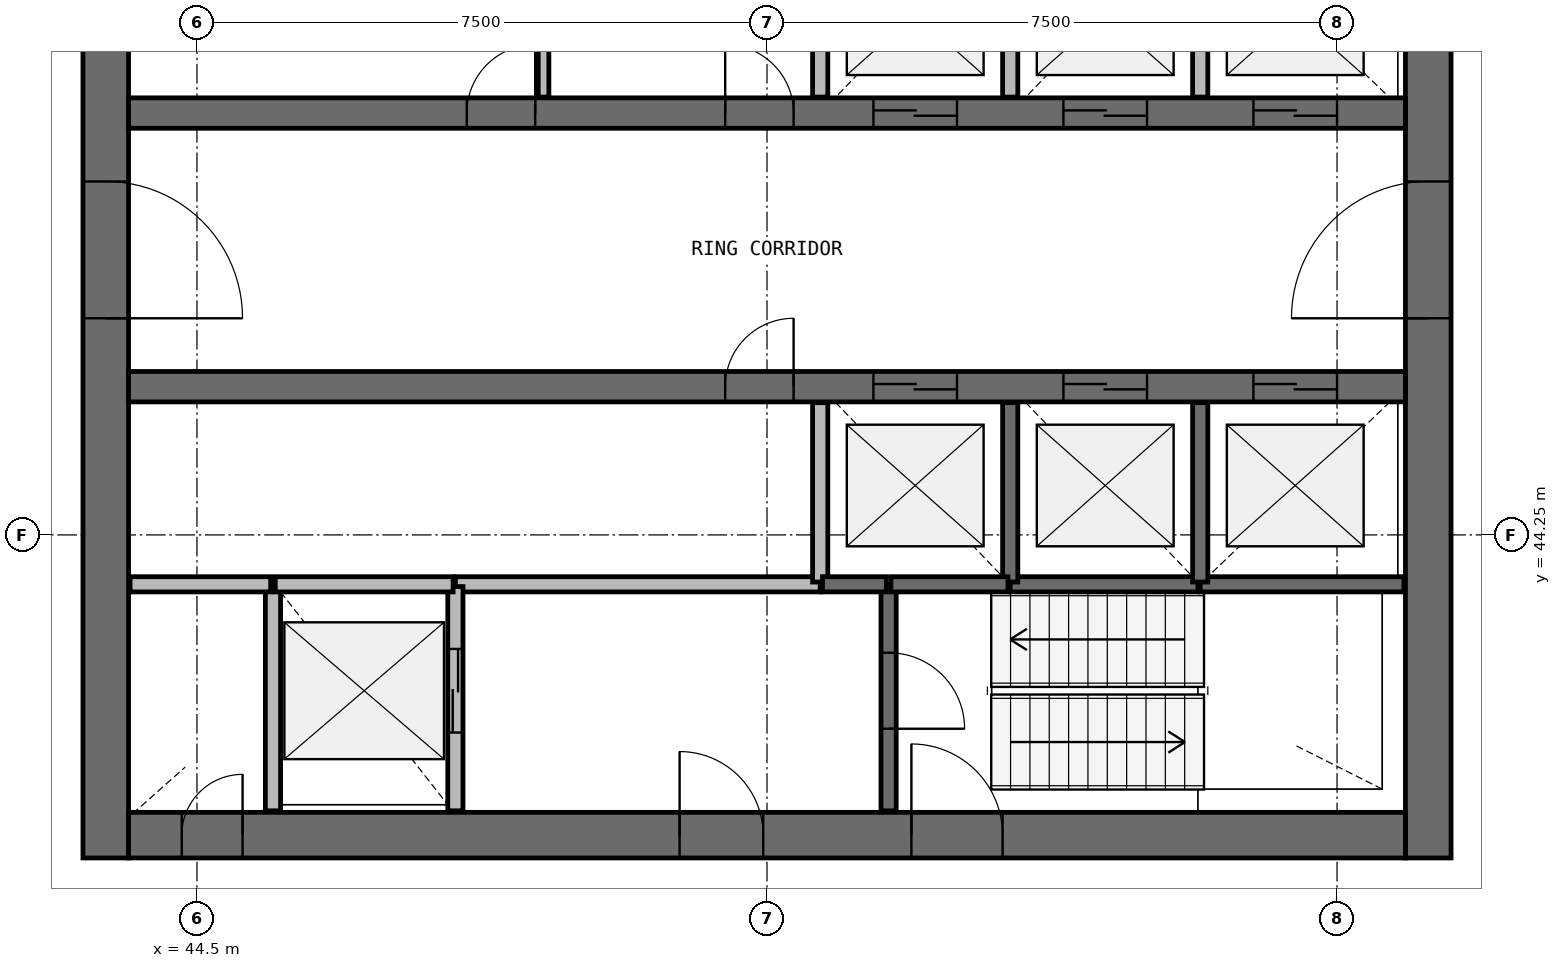
"""IFC4 building model, lengths in metres.
Left out: names, types, materials, properties, quantities, classifications, styles, units other than length and angle.
Written with IfcOpenShell. Run it as: python <this file> out.ifc"""

import sys

from ifc_helpers import new_model, si_unit, direction, frame, frame_2d, origin, place, context, subcontext, project, spatial, rectangle, extrude, source, transform, mapped, element, fill, save


model = new_model("IFC4")
c1 = context("Model", 3, precision=1e-05, world=origin(), true_north=direction((0.0, 1.0)))
c2 = subcontext(c1, "Body", "Model", "MODEL_VIEW")
j1 = project(units=[si_unit("LENGTHUNIT", "METRE"), si_unit("PLANEANGLEUNIT", "RADIAN")], contexts=[c1])
p1 = place(None, origin())
s1 = spatial("IfcSite", under=j1, at=p1, CompositionType="ELEMENT")
p2 = place(p1, origin())
s2 = spatial("IfcBuilding", under=s1, at=p2, CompositionType="ELEMENT")
p3 = place(p2, frame((0.0, 0.0, 254.0)))
s3 = spatial("IfcBuildingStorey", under=s2, at=p3, CompositionType="ELEMENT", Elevation=254.0)
p4 = place(p3, frame((60.7, 40.0, 0.0), z_axis=(0.0, 0.0, 1.0), x_axis=(0.0, 1.0, 0.0)))
e1 = element("IfcWall", 1, at=p4, inside=s3, PredefinedType="SHEAR", context=c2, shape_type="SweptSolid", body=[
    extrude(rectangle(XDim=16.0, YDim=0.6, at=frame_2d((8.0, 0.0))), origin(), (0.0, 0.0, 1.0), 3.9),
])
p5 = place(p4, frame((7.1, 0.0, 0.0)))
e2 = element("IfcOpeningElement", 2, at=p5, cuts=e1, PredefinedType="OPENING", context=c2, shape_type="SweptSolid", body=[
    extrude(rectangle(XDim=1.8, YDim=2.1, at=frame_2d((0.9, 1.05))), frame((0.0, 0.31, 0.0), z_axis=(0.0, -1.0, 0.0), x_axis=(1.0, 0.0, 0.0)), (0.0, 0.0, 1.0), 0.62),
])
p6 = place(p3, frame((43.3, 56.0, 0.0), z_axis=(0.0, 0.0, 1.0), x_axis=(0.0, -1.0, 0.0)))
e3 = element("IfcWall", 3, at=p6, inside=s3, PredefinedType="SHEAR", context=c2, shape_type="SweptSolid", body=[
    extrude(rectangle(XDim=16.0, YDim=0.6, at=frame_2d((8.0, 0.0))), origin(), (0.0, 0.0, 1.0), 3.9),
])
p7 = place(p6, frame((7.1, 0.0, 0.0)))
e4 = element("IfcOpeningElement", 4, at=p7, cuts=e3, PredefinedType="OPENING", context=c2, shape_type="SweptSolid", body=[
    extrude(rectangle(XDim=1.8, YDim=2.1, at=frame_2d((0.9, 1.05))), frame((0.0, 0.31, 0.0), z_axis=(0.0, -1.0, 0.0), x_axis=(1.0, 0.0, 0.0)), (0.0, 0.0, 1.0), 0.62),
])
p8 = place(p3, frame((43.6, 40.3, 0.0), z_axis=(0.0, 0.0, 1.0), x_axis=(1.0, 0.0, 0.0)))
e5 = element("IfcWall", 5, at=p8, inside=s3, PredefinedType="SHEAR", context=c2, shape_type="SweptSolid", body=[
    extrude(rectangle(XDim=16.8, YDim=0.6, at=frame_2d((8.4, 0.0))), origin(), (0.0, 0.0, 1.0), 3.9),
])
p9 = place(p8, frame((10.3, 0.0, 0.0)))
e6 = element("IfcOpeningElement", 6, at=p9, cuts=e5, PredefinedType="OPENING", context=c2, shape_type="SweptSolid", body=[
    extrude(rectangle(XDim=1.2, YDim=2.1, at=frame_2d((0.6, 1.05))), frame((0.0, 0.31, 0.0), z_axis=(0.0, -1.0, 0.0), x_axis=(1.0, 0.0, 0.0)), (0.0, 0.0, 1.0), 0.62),
])
p10 = place(p8, frame((7.25, 0.0, 0.0)))
e7 = element("IfcOpeningElement", 7, at=p10, cuts=e5, PredefinedType="OPENING", context=c2, shape_type="SweptSolid", body=[
    extrude(rectangle(XDim=1.1, YDim=2.1, at=frame_2d((0.55, 1.05))), frame((0.0, 0.31, 0.0), z_axis=(0.0, -1.0, 0.0), x_axis=(1.0, 0.0, 0.0)), (0.0, 0.0, 1.0), 0.62),
])
p11 = place(p8, frame((0.7, 0.0, 0.0)))
e8 = element("IfcOpeningElement", 8, at=p11, cuts=e5, PredefinedType="OPENING", context=c2, shape_type="SweptSolid", body=[
    extrude(rectangle(XDim=0.8, YDim=2.1, at=frame_2d((0.4, 1.05))), frame((0.0, 0.31, 0.0), z_axis=(0.0, -1.0, 0.0), x_axis=(1.0, 0.0, 0.0)), (0.0, 0.0, 1.0), 0.62),
])
p12 = place(p3, frame((43.6, 49.8, 0.0), z_axis=(0.0, 0.0, 1.0), x_axis=(1.0, 0.0, 0.0)))
e9 = element("IfcWall", 9, at=p12, inside=s3, PredefinedType="SHEAR", context=c2, shape_type="SweptSolid", body=[
    extrude(rectangle(XDim=16.8, YDim=0.4, at=frame_2d((8.4, 0.0))), origin(), (0.0, 0.0, 1.0), 3.9),
])
p13 = place(p12, frame((9.8, 0.0, 0.0)))
e10 = element("IfcOpeningElement", 10, at=p13, cuts=e9, PredefinedType="OPENING", context=c2, shape_type="SweptSolid", body=[
    extrude(rectangle(XDim=1.1, YDim=2.1, at=frame_2d((0.55, 1.05))), frame((0.0, 0.21, 0.0), z_axis=(0.0, -1.0, 0.0), x_axis=(1.0, 0.0, 0.0)), (0.0, 0.0, 1.0), 0.42),
])
p14 = place(p12, frame((12.3, 0.0, 0.0)))
e11 = element("IfcOpeningElement", 11, at=p14, cuts=e9, PredefinedType="OPENING", context=c2, shape_type="SweptSolid", body=[
    extrude(rectangle(XDim=1.1, YDim=2.1, at=frame_2d((0.55, 1.05))), frame((0.0, 0.21, 0.0), z_axis=(0.0, -1.0, 0.0), x_axis=(1.0, 0.0, 0.0)), (0.0, 0.0, 1.0), 0.42),
])
p15 = place(p12, frame((14.8, 0.0, 0.0)))
e12 = element("IfcOpeningElement", 12, at=p15, cuts=e9, PredefinedType="OPENING", context=c2, shape_type="SweptSolid", body=[
    extrude(rectangle(XDim=1.1, YDim=2.1, at=frame_2d((0.55, 1.05))), frame((0.0, 0.21, 0.0), z_axis=(0.0, -1.0, 0.0), x_axis=(1.0, 0.0, 0.0)), (0.0, 0.0, 1.0), 0.42),
])
p16 = place(p12, frame((4.45, 0.0, 0.0)))
e13 = element("IfcOpeningElement", 13, at=p16, cuts=e9, PredefinedType="OPENING", context=c2, shape_type="SweptSolid", body=[
    extrude(rectangle(XDim=0.9, YDim=2.1, at=frame_2d((0.45, 1.05))), frame((0.0, 0.21, 0.0), z_axis=(0.0, -1.0, 0.0), x_axis=(1.0, 0.0, 0.0)), (0.0, 0.0, 1.0), 0.42),
])
p17 = place(p12, frame((7.85, 0.0, 0.0)))
e14 = element("IfcOpeningElement", 14, at=p17, cuts=e9, PredefinedType="OPENING", context=c2, shape_type="SweptSolid", body=[
    extrude(rectangle(XDim=0.9, YDim=2.1, at=frame_2d((0.45, 1.05))), frame((0.0, 0.21, 0.0), z_axis=(0.0, -1.0, 0.0), x_axis=(1.0, 0.0, 0.0)), (0.0, 0.0, 1.0), 0.42),
])
p18 = place(p3, frame((43.6, 46.2, 0.0), z_axis=(0.0, 0.0, 1.0), x_axis=(1.0, 0.0, 0.0)))
e15 = element("IfcWall", 15, at=p18, inside=s3, PredefinedType="SHEAR", context=c2, shape_type="SweptSolid", body=[
    extrude(rectangle(XDim=16.8, YDim=0.4, at=frame_2d((8.4, 0.0))), origin(), (0.0, 0.0, 1.0), 3.9),
])
p19 = place(p18, frame((9.8, 0.0, 0.0)))
e16 = element("IfcOpeningElement", 16, at=p19, cuts=e15, PredefinedType="OPENING", context=c2, shape_type="SweptSolid", body=[
    extrude(rectangle(XDim=1.1, YDim=2.1, at=frame_2d((0.55, 1.05))), frame((0.0, 0.21, 0.0), z_axis=(0.0, -1.0, 0.0), x_axis=(1.0, 0.0, 0.0)), (0.0, 0.0, 1.0), 0.42),
])
p20 = place(p18, frame((12.3, 0.0, 0.0)))
e17 = element("IfcOpeningElement", 17, at=p20, cuts=e15, PredefinedType="OPENING", context=c2, shape_type="SweptSolid", body=[
    extrude(rectangle(XDim=1.1, YDim=2.1, at=frame_2d((0.55, 1.05))), frame((0.0, 0.21, 0.0), z_axis=(0.0, -1.0, 0.0), x_axis=(1.0, 0.0, 0.0)), (0.0, 0.0, 1.0), 0.42),
])
p21 = place(p18, frame((14.8, 0.0, 0.0)))
e18 = element("IfcOpeningElement", 18, at=p21, cuts=e15, PredefinedType="OPENING", context=c2, shape_type="SweptSolid", body=[
    extrude(rectangle(XDim=1.1, YDim=2.1, at=frame_2d((0.55, 1.05))), frame((0.0, 0.21, 0.0), z_axis=(0.0, -1.0, 0.0), x_axis=(1.0, 0.0, 0.0)), (0.0, 0.0, 1.0), 0.42),
])
p22 = place(p18, frame((7.85, 0.0, 0.0)))
e19 = element("IfcOpeningElement", 19, at=p22, cuts=e15, PredefinedType="OPENING", context=c2, shape_type="SweptSolid", body=[
    extrude(rectangle(XDim=0.9, YDim=2.1, at=frame_2d((0.45, 1.05))), frame((0.0, 0.21, 0.0), z_axis=(0.0, -1.0, 0.0), x_axis=(1.0, 0.0, 0.0)), (0.0, 0.0, 1.0), 0.42),
])
p23 = place(p3, frame((52.7, 43.6, 0.0), z_axis=(0.0, 0.0, 1.0), x_axis=(-1.0, 0.0, 0.0)))
e20 = element("IfcWall", 20, at=p23, inside=s3, PredefinedType="SOLIDWALL", context=c2, shape_type="SweptSolid", body=[
    extrude(rectangle(XDim=4.8, YDim=0.2, at=frame_2d((2.4, 0.0))), origin(), (0.0, 0.0, 1.0), 3.58),
])
p24 = place(p3, frame((45.5, 43.6, 0.0), z_axis=(0.0, 0.0, 1.0), x_axis=(0.0, -1.0, 0.0)))
e21 = element("IfcWall", 21, at=p24, inside=s3, PredefinedType="SOLIDWALL", context=c2, shape_type="SweptSolid", body=[
    extrude(rectangle(XDim=2.98, YDim=0.2, at=frame_2d((1.49, 0.0))), origin(), (0.0, 0.0, 1.0), 3.58),
])
p25 = place(p3, frame((47.9, 40.62, 0.0), z_axis=(0.0, 0.0, 1.0), x_axis=(0.0, 1.0, 0.0)))
e22 = element("IfcWall", 22, at=p25, inside=s3, PredefinedType="SOLIDWALL", context=c2, shape_type="SweptSolid", body=[
    extrude(rectangle(XDim=2.95, YDim=0.2, at=frame_2d((1.475, 0.0))), origin(), (0.0, 0.0, 1.0), 3.58),
])
p26 = place(p25, frame((1.03, 0.0, 0.0)))
e23 = element("IfcOpeningElement", 23, at=p26, cuts=e22, PredefinedType="OPENING", context=c2, shape_type="SweptSolid", body=[
    extrude(rectangle(XDim=1.1, YDim=2.1, at=frame_2d((0.55, 1.05))), frame((0.0, 0.11, 0.0), z_axis=(0.0, -1.0, 0.0), x_axis=(1.0, 0.0, 0.0)), (0.0, 0.0, 1.0), 0.22),
])
p27 = place(p3, frame((53.6, 43.6, 0.0), z_axis=(0.0, 0.0, 1.0), x_axis=(0.0, -1.0, 0.0)))
e24 = element("IfcWall", 24, at=p27, inside=s3, PredefinedType="SOLIDWALL", context=c2, shape_type="SweptSolid", body=[
    extrude(rectangle(XDim=2.98, YDim=0.2, at=frame_2d((1.49, 0.0))), origin(), (0.0, 0.0, 1.0), 3.58),
])
p28 = place(p27, frame((0.9, 0.0, 0.0)))
e25 = element("IfcOpeningElement", 25, at=p28, cuts=e24, PredefinedType="OPENING", context=c2, shape_type="SweptSolid", body=[
    extrude(rectangle(XDim=1.0, YDim=2.1, at=frame_2d((0.5, 1.05))), frame((0.0, 0.11, 0.0), z_axis=(0.0, -1.0, 0.0), x_axis=(1.0, 0.0, 0.0)), (0.0, 0.0, 1.0), 0.22),
])
p29 = place(p3, frame((57.7, 43.6, 0.0), z_axis=(0.0, 0.0, 1.0), x_axis=(1.0, 0.0, 0.0)))
e26 = element("IfcWall", 26, at=p29, inside=s3, PredefinedType="SOLIDWALL", context=c2, shape_type="SweptSolid", body=[
    extrude(rectangle(XDim=2.68, YDim=0.2, at=frame_2d((1.34, 0.0))), origin(), (0.0, 0.0, 1.0), 3.58),
])
p30 = place(p3, frame((55.2, 43.6, 0.0), z_axis=(0.0, 0.0, 1.0), x_axis=(1.0, 0.0, 0.0)))
e27 = element("IfcWall", 27, at=p30, inside=s3, PredefinedType="SOLIDWALL", context=c2, shape_type="SweptSolid", body=[
    extrude(rectangle(XDim=2.47, YDim=0.2, at=frame_2d((1.235, 0.0))), origin(), (0.0, 0.0, 1.0), 3.58),
])
p31 = place(p3, frame((47.87, 43.6, 0.0), z_axis=(0.0, 0.0, 1.0), x_axis=(-1.0, 0.0, 0.0)))
e28 = element("IfcWall", 28, at=p31, inside=s3, PredefinedType="SOLIDWALL", context=c2, shape_type="SweptSolid", body=[
    extrude(rectangle(XDim=2.34, YDim=0.2, at=frame_2d((1.17, 0.0))), origin(), (0.0, 0.0, 1.0), 3.58),
])
for number, where, z_axis, x_axis in (
    (29, (52.7, 45.99, 0.0), (0.0, 0.0, 1.0), (0.0, -1.0, 0.0)),
    (30, (52.7, 52.37, 0.0), (0.0, 0.0, 1.0), (0.0, -1.0, 0.0)),
    (31, (55.2, 43.63, 0.0), (0.0, 0.0, 1.0), (0.0, 1.0, 0.0)),
    (32, (55.2, 50.01, 0.0), (0.0, 0.0, 1.0), (0.0, 1.0, 0.0)),
    (33, (57.7, 43.63, 0.0), (0.0, 0.0, 1.0), (0.0, 1.0, 0.0)),
):
    element("IfcWall", number, at=place(p3, frame(where, z_axis=z_axis, x_axis=x_axis)), inside=s3, PredefinedType="SOLIDWALL", context=c2, shape_type="SweptSolid", body=[
        extrude(rectangle(XDim=2.36, YDim=0.2, at=frame_2d((1.18, 0.0))), origin(), (0.0, 0.0, 1.0), 3.58),
    ])
p32 = place(p3, frame((57.7, 50.01, 0.0), z_axis=(0.0, 0.0, 1.0), x_axis=(0.0, 1.0, 0.0)))
e34 = element("IfcWall", 34, at=p32, inside=s3, PredefinedType="SOLIDWALL", context=c2, shape_type="SweptSolid", body=[
    extrude(rectangle(XDim=2.39, YDim=0.2, at=frame_2d((1.195, 0.0))), origin(), (0.0, 0.0, 1.0), 3.58),
])
p33 = place(p3, frame((45.47, 43.6, 0.0), z_axis=(0.0, 0.0, 1.0), x_axis=(-1.0, 0.0, 0.0)))
e35 = element("IfcWall", 35, at=p33, inside=s3, PredefinedType="SOLIDWALL", context=c2, shape_type="SweptSolid", body=[
    extrude(rectangle(XDim=1.85, YDim=0.2, at=frame_2d((0.925, 0.0))), origin(), (0.0, 0.0, 1.0), 3.58),
])
p34 = place(p3, frame((53.63, 43.6, 0.0), z_axis=(0.0, 0.0, 1.0), x_axis=(1.0, 0.0, 0.0)))
e36 = element("IfcWall", 36, at=p34, inside=s3, PredefinedType="SOLIDWALL", context=c2, shape_type="SweptSolid", body=[
    extrude(rectangle(XDim=1.54, YDim=0.2, at=frame_2d((0.77, 0.0))), origin(), (0.0, 0.0, 1.0), 3.58),
])
p35 = place(p3, frame((52.73, 43.6, 0.0), z_axis=(0.0, 0.0, 1.0), x_axis=(1.0, 0.0, 0.0)))
e37 = element("IfcWall", 37, at=p35, inside=s3, PredefinedType="SOLIDWALL", context=c2, shape_type="SweptSolid", body=[
    extrude(rectangle(XDim=0.84, YDim=0.2, at=frame_2d((0.42, 0.0))), origin(), (0.0, 0.0, 1.0), 3.58),
])
p36 = place(p3, frame((49.06, 50.01, 0.0), z_axis=(0.0, 0.0, 1.0), x_axis=(0.0, 1.0, 0.0)))
e38 = element("IfcWall", 38, at=p36, inside=s3, PredefinedType="PARTITIONING", context=c2, shape_type="SweptSolid", body=[
    extrude(rectangle(XDim=2.29, YDim=0.14, at=frame_2d((1.145, 0.0))), origin(), (0.0, 0.0, 1.0), 2.88),
])
m1 = source(origin(), c2, "Body", "SweptSolid", [
    extrude(rectangle(XDim=1.8, YDim=2.1, at=frame_2d((0.9, 1.05))), frame((0.0, 0.025, 0.0), z_axis=(0.0, -1.0, 0.0), x_axis=(1.0, 0.0, 0.0)), (0.0, 0.0, 1.0), 0.05),
])
p37 = place(p7, origin())
e39 = element("IfcDoor", 39, at=p37, inside=s3, OperationType="SINGLE_SWING_RIGHT", PredefinedType="DOOR", context=c2, shape_type="MappedRepresentation", body=[
    mapped(m1, transform((0.0, 0.0, 0.0), scale=1.0)),
])
fill(e4, e39)
p38 = place(p5, origin())
e40 = element("IfcDoor", 40, at=p38, inside=s3, OperationType="SINGLE_SWING_LEFT", PredefinedType="DOOR", context=c2, shape_type="MappedRepresentation", body=[
    mapped(m1, transform((0.0, 0.0, 0.0), scale=1.0)),
])
fill(e2, e40)
m2 = source(origin(), c2, "Body", "SweptSolid", [
    extrude(rectangle(XDim=1.1, YDim=2.1, at=frame_2d((0.55, 1.05))), frame((0.0, 0.025, 0.0), z_axis=(0.0, -1.0, 0.0), x_axis=(1.0, 0.0, 0.0)), (0.0, 0.0, 1.0), 0.05),
])
p39 = place(p13, origin())
e41 = element("IfcDoor", 41, at=p39, inside=s3, OperationType="DOUBLE_DOOR_SLIDING", PredefinedType="USERDEFINED", context=c2, shape_type="MappedRepresentation", body=[
    mapped(m2, transform((0.0, 0.0, 0.0), scale=1.0)),
])
fill(e10, e41)
p40 = place(p14, origin())
e42 = element("IfcDoor", 42, at=p40, inside=s3, OperationType="DOUBLE_DOOR_SLIDING", PredefinedType="USERDEFINED", context=c2, shape_type="MappedRepresentation", body=[
    mapped(m2, transform((0.0, 0.0, 0.0), scale=1.0)),
])
fill(e11, e42)
p41 = place(p15, origin())
e43 = element("IfcDoor", 43, at=p41, inside=s3, OperationType="DOUBLE_DOOR_SLIDING", PredefinedType="USERDEFINED", context=c2, shape_type="MappedRepresentation", body=[
    mapped(m2, transform((0.0, 0.0, 0.0), scale=1.0)),
])
fill(e12, e43)
p42 = place(p19, origin())
e44 = element("IfcDoor", 44, at=p42, inside=s3, OperationType="DOUBLE_DOOR_SLIDING", PredefinedType="USERDEFINED", context=c2, shape_type="MappedRepresentation", body=[
    mapped(m2, transform((0.0, 0.0, 0.0), scale=1.0)),
])
fill(e16, e44)
p43 = place(p20, origin())
e45 = element("IfcDoor", 45, at=p43, inside=s3, OperationType="DOUBLE_DOOR_SLIDING", PredefinedType="USERDEFINED", context=c2, shape_type="MappedRepresentation", body=[
    mapped(m2, transform((0.0, 0.0, 0.0), scale=1.0)),
])
fill(e17, e45)
p44 = place(p21, origin())
e46 = element("IfcDoor", 46, at=p44, inside=s3, OperationType="DOUBLE_DOOR_SLIDING", PredefinedType="USERDEFINED", context=c2, shape_type="MappedRepresentation", body=[
    mapped(m2, transform((0.0, 0.0, 0.0), scale=1.0)),
])
fill(e18, e46)
p45 = place(p26, origin())
e47 = element("IfcDoor", 47, at=p45, inside=s3, OperationType="DOUBLE_DOOR_SLIDING", PredefinedType="USERDEFINED", context=c2, shape_type="MappedRepresentation", body=[
    mapped(m2, transform((0.0, 0.0, 0.0), scale=1.0)),
])
fill(e23, e47)
m3 = source(origin(), c2, "Body", "SweptSolid", [
    extrude(rectangle(XDim=1.2, YDim=2.1, at=frame_2d((0.6, 1.05))), frame((0.0, 0.025, 0.0), z_axis=(0.0, -1.0, 0.0), x_axis=(1.0, 0.0, 0.0)), (0.0, 0.0, 1.0), 0.05),
])
p46 = place(p9, origin())
e48 = element("IfcDoor", 48, at=p46, inside=s3, OperationType="SINGLE_SWING_LEFT", PredefinedType="DOOR", context=c2, shape_type="MappedRepresentation", body=[
    mapped(m3, transform((0.0, 0.0, 0.0), scale=1.0)),
])
fill(e6, e48)
m4 = source(origin(), c2, "Body", "SweptSolid", [
    extrude(rectangle(XDim=1.0, YDim=2.1, at=frame_2d((0.5, 1.05))), frame((0.0, 0.025, 0.0), z_axis=(0.0, -1.0, 0.0), x_axis=(1.0, 0.0, 0.0)), (0.0, 0.0, 1.0), 0.05),
])
p47 = place(p28, origin())
e49 = element("IfcDoor", 49, at=p47, inside=s3, OperationType="SINGLE_SWING_RIGHT", PredefinedType="DOOR", context=c2, shape_type="MappedRepresentation", body=[
    mapped(m4, transform((0.0, 0.0, 0.0), scale=1.0)),
])
fill(e25, e49)
m5 = source(origin(), c2, "Body", "SweptSolid", [
    extrude(rectangle(XDim=1.1, YDim=2.1, at=frame_2d((0.55, 1.05))), frame((0.0, 0.025, 0.0), z_axis=(0.0, -1.0, 0.0), x_axis=(1.0, 0.0, 0.0)), (0.0, 0.0, 1.0), 0.05),
])
p48 = place(p10, origin())
e50 = element("IfcDoor", 50, at=p48, inside=s3, OperationType="SINGLE_SWING_LEFT", PredefinedType="DOOR", context=c2, shape_type="MappedRepresentation", body=[
    mapped(m5, transform((0.0, 0.0, 0.0), scale=1.0)),
])
fill(e7, e50)
m6 = source(origin(), c2, "Body", "SweptSolid", [
    extrude(rectangle(XDim=0.8, YDim=2.1, at=frame_2d((0.4, 1.05))), frame((0.0, 0.025, 0.0), z_axis=(0.0, -1.0, 0.0), x_axis=(1.0, 0.0, 0.0)), (0.0, 0.0, 1.0), 0.05),
])
p49 = place(p11, origin())
e51 = element("IfcDoor", 51, at=p49, inside=s3, OperationType="SINGLE_SWING_RIGHT", PredefinedType="DOOR", context=c2, shape_type="MappedRepresentation", body=[
    mapped(m6, transform((0.0, 0.0, 0.0), scale=1.0)),
])
fill(e8, e51)
m7 = source(origin(), c2, "Body", "SweptSolid", [
    extrude(rectangle(XDim=0.9, YDim=2.1, at=frame_2d((0.45, 1.05))), frame((0.0, 0.025, 0.0), z_axis=(0.0, -1.0, 0.0), x_axis=(1.0, 0.0, 0.0)), (0.0, 0.0, 1.0), 0.05),
])
p50 = place(p16, origin())
e52 = element("IfcDoor", 52, at=p50, inside=s3, OperationType="SINGLE_SWING_RIGHT", PredefinedType="DOOR", context=c2, shape_type="MappedRepresentation", body=[
    mapped(m7, transform((0.0, 0.0, 0.0), scale=1.0)),
])
fill(e13, e52)
p51 = place(p17, origin())
e53 = element("IfcDoor", 53, at=p51, inside=s3, OperationType="SINGLE_SWING_LEFT", PredefinedType="DOOR", context=c2, shape_type="MappedRepresentation", body=[
    mapped(m7, transform((0.0, 0.0, 0.0), scale=1.0)),
])
fill(e14, e53)
p52 = place(p22, origin())
e54 = element("IfcDoor", 54, at=p52, inside=s3, OperationType="SINGLE_SWING_RIGHT", PredefinedType="DOOR", context=c2, shape_type="MappedRepresentation", body=[
    mapped(m7, transform((0.0, 0.0, 0.0), scale=1.0)),
])
fill(e19, e54)
save(model, sys.argv[1])
